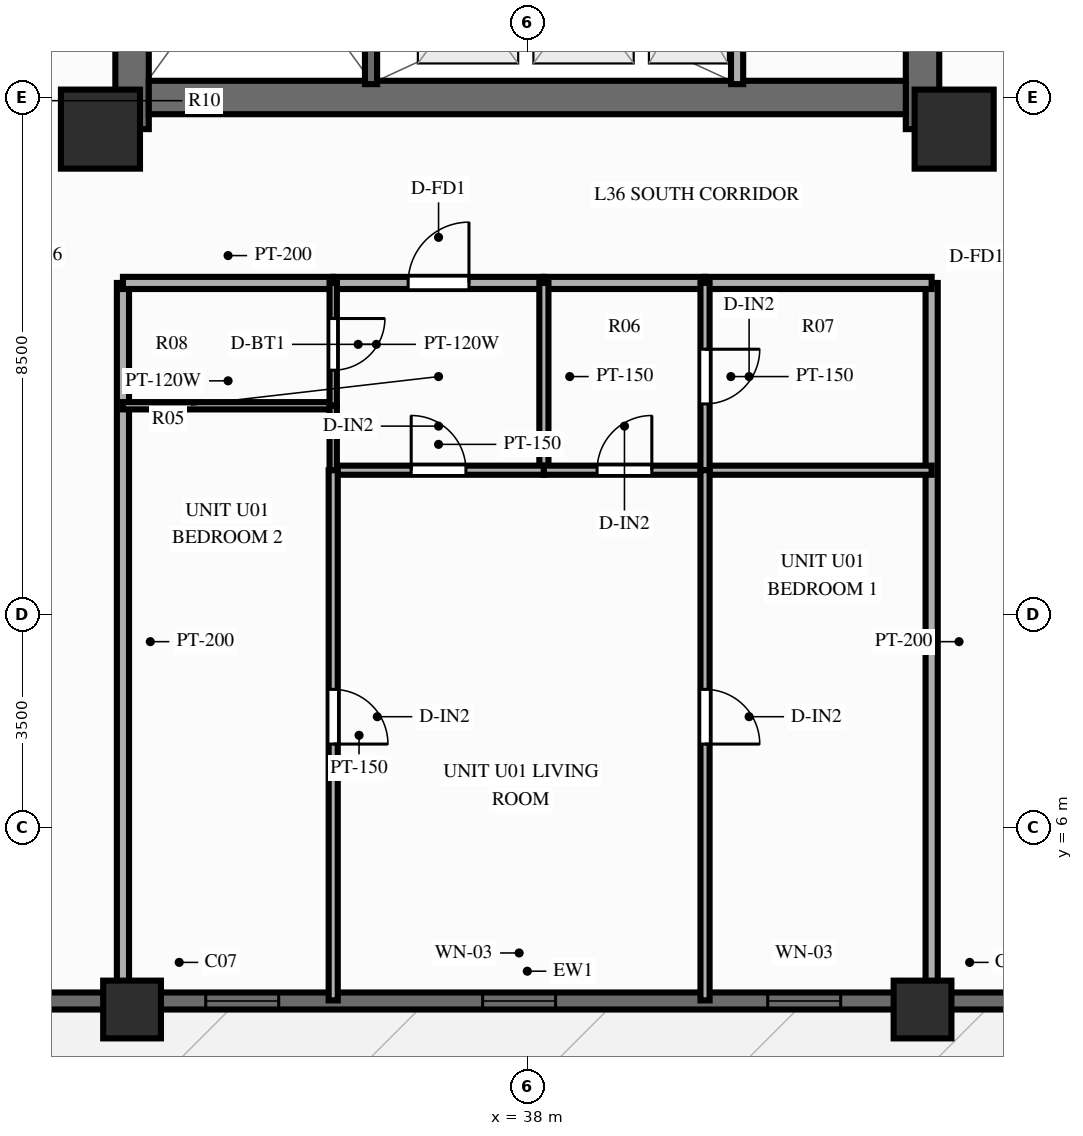
"""IFC4 building model, lengths in metres.
Left out: names, types, materials, properties, quantities, classifications, styles, units other than length and angle.
Written with IfcOpenShell. Run it as: python <this file> out.ifc"""

import sys

from ifc_helpers import new_model, si_unit, direction, frame, frame_2d, origin, origin_2d, place, context, subcontext, project, spatial, rectangle, extrude, source, transform, mapped, element, fill, save


model = new_model("IFC4")
c1 = context("Model", 3, precision=1e-05, world=origin(), true_north=direction((0.0, 1.0)))
c2 = subcontext(c1, "Body", "Model", "MODEL_VIEW")
j1 = project(units=[si_unit("LENGTHUNIT", "METRE"), si_unit("PLANEANGLEUNIT", "RADIAN")], contexts=[c1])
p1 = place(None, origin())
s1 = spatial("IfcSite", under=j1, at=p1, CompositionType="ELEMENT")
p2 = place(p1, origin())
s2 = spatial("IfcBuilding", under=s1, at=p2, CompositionType="ELEMENT")
p3 = place(p2, frame((0.0, 0.0, 113.85)))
s3 = spatial("IfcBuildingStorey", under=s2, at=p3, CompositionType="ELEMENT", Elevation=113.85)
p4 = place(p3, frame((31.5, 17.48, 0.0), z_axis=(0.0, 0.0, 1.0), x_axis=(0.0, 1.0, 0.0)))
e1 = element("IfcWall", 1, at=p4, inside=s3, PredefinedType="SHEAR", context=c2, shape_type="SweptSolid", body=[
    extrude(rectangle(XDim=19.04, YDim=0.55, at=frame_2d((9.52, 0.0))), origin(), (0.0, 0.0, 1.0), 3.0),
])
p5 = place(p4, frame((6.32, 0.0, 0.0)))
e2 = element("IfcOpeningElement", 2, at=p5, cuts=e1, PredefinedType="OPENING", context=c2, shape_type="SweptSolid", body=[
    extrude(rectangle(XDim=1.1, YDim=2.15, at=frame_2d((0.55, 1.075))), frame((0.0, 0.287, 0.0), z_axis=(0.0, -1.0, 0.0), x_axis=(1.0, 0.0, 0.0)), (0.0, 0.0, 1.0), 0.574),
])
p6 = place(p3, frame((44.5, 17.48, 0.0), z_axis=(0.0, 0.0, 1.0), x_axis=(0.0, 1.0, 0.0)))
e3 = element("IfcWall", 3, at=p6, inside=s3, PredefinedType="SHEAR", context=c2, shape_type="SweptSolid", body=[
    extrude(rectangle(XDim=19.04, YDim=0.55, at=frame_2d((9.52, 0.0))), origin(), (0.0, 0.0, 1.0), 3.0),
])
p7 = place(p6, frame((12.67, 0.0, 0.0), z_axis=(0.0, 0.0, 1.0), x_axis=(-1.0, 0.0, 0.0)))
e4 = element("IfcOpeningElement", 4, at=p7, cuts=e3, PredefinedType="OPENING", context=c2, shape_type="SweptSolid", body=[
    extrude(rectangle(XDim=1.1, YDim=2.15, at=frame_2d((0.55, 1.075))), frame((0.0, 0.287, 0.0), z_axis=(0.0, -1.0, 0.0), x_axis=(1.0, 0.0, 0.0)), (0.0, 0.0, 1.0), 0.574),
])
p8 = place(p3, frame((31.775, 18.0, 0.0), z_axis=(0.0, 0.0, 1.0), x_axis=(1.0, 0.0, 0.0)))
e5 = element("IfcWall", 5, at=p8, inside=s3, PredefinedType="SHEAR", context=c2, shape_type="SweptSolid", body=[
    extrude(rectangle(XDim=12.45, YDim=0.55, at=frame_2d((6.225, 0.0))), origin(), (0.0, 0.0, 1.0), 3.0),
])
m1 = source(origin(), c2, "Body", "SweptSolid", [
    extrude(rectangle(XDim=1.3, YDim=1.3, at=origin_2d()), origin(), (0.0, 0.0, 1.0), 3.0),
])
for number, where, z_axis, x_axis in (
    (6, (30.98, 17.48, 0.0), (0.0, 0.0, 1.0), (1.0, 0.0, 0.0)),
    (7, (45.02, 17.48, 0.0), (0.0, 0.0, 1.0), (1.0, 0.0, 0.0)),
):
    element("IfcColumn", number, at=place(p3, frame(where, z_axis=z_axis, x_axis=x_axis)), inside=s3, PredefinedType="COLUMN", context=c2, shape_type="MappedRepresentation", body=[
        mapped(m1, transform((0.0, 0.0, 0.0), scale=1.0)),
    ])
m2 = source(origin(), c2, "Body", "SweptSolid", [
    extrude(rectangle(XDim=0.95, YDim=0.95, at=origin_2d()), origin(), (0.0, 0.0, 1.0), 3.0),
])
for number, where, z_axis, x_axis in (
    (8, (31.5, 3.0, 0.0), (0.0, 0.0, 1.0), (1.0, 0.0, 0.0)),
    (9, (44.5, 3.0, 0.0), (0.0, 0.0, 1.0), (1.0, 0.0, 0.0)),
):
    element("IfcColumn", number, at=place(p3, frame(where, z_axis=z_axis, x_axis=x_axis)), inside=s3, PredefinedType="COLUMN", context=c2, shape_type="MappedRepresentation", body=[
        mapped(m2, transform((0.0, 0.0, 0.0), scale=1.0)),
    ])
p9 = place(p3, frame((16.2, 3.14, 0.0), z_axis=(0.0, 0.0, 1.0), x_axis=(1.0, 0.0, 0.0)))
e10 = element("IfcWall", 10, at=p9, inside=s3, PredefinedType="SOLIDWALL", context=c2, shape_type="SweptSolid", body=[
    extrude(rectangle(XDim=43.6, YDim=0.28, at=frame_2d((21.8, 0.0))), origin(), (0.0, 0.0, 1.0), 2.28),
])
p10 = place(p9, frame((8.2, 0.0, 0.0), z_axis=(0.0, 0.0, 1.0), x_axis=(-1.0, 0.0, 0.0)))
e11 = element("IfcOpeningElement", 11, at=p10, cuts=e10, PredefinedType="OPENING", context=c2, shape_type="SweptSolid", body=[
    extrude(rectangle(XDim=1.1, YDim=2.15, at=frame_2d((0.55, 1.075))), frame((0.0, 0.152, 0.0), z_axis=(0.0, -1.0, 0.0), x_axis=(1.0, 0.0, 0.0)), (0.0, 0.0, 1.0), 0.304),
])
p11 = place(p9, frame((16.511, 0.0, 0.25)))
e12 = element("IfcOpeningElement", 12, at=p11, cuts=e10, PredefinedType="OPENING", context=c2, shape_type="SweptSolid", body=[
    extrude(rectangle(XDim=1.2, YDim=1.5, at=frame_2d((0.6, 0.75))), frame((0.0, 0.152, 0.0), z_axis=(0.0, -1.0, 0.0), x_axis=(1.0, 0.0, 0.0)), (0.0, 0.0, 1.0), 0.304),
])
p12 = place(p9, frame((21.065, 0.0, 0.25)))
e13 = element("IfcOpeningElement", 13, at=p12, cuts=e10, PredefinedType="OPENING", context=c2, shape_type="SweptSolid", body=[
    extrude(rectangle(XDim=1.2, YDim=1.5, at=frame_2d((0.6, 0.75))), frame((0.0, 0.152, 0.0), z_axis=(0.0, -1.0, 0.0), x_axis=(1.0, 0.0, 0.0)), (0.0, 0.0, 1.0), 0.304),
])
p13 = place(p9, frame((25.754, 0.0, 0.25)))
e14 = element("IfcOpeningElement", 14, at=p13, cuts=e10, PredefinedType="OPENING", context=c2, shape_type="SweptSolid", body=[
    extrude(rectangle(XDim=1.2, YDim=1.5, at=frame_2d((0.6, 0.75))), frame((0.0, 0.152, 0.0), z_axis=(0.0, -1.0, 0.0), x_axis=(1.0, 0.0, 0.0)), (0.0, 0.0, 1.0), 0.304),
])
p14 = place(p9, frame((35.35, 0.0, 0.25)))
e15 = element("IfcOpeningElement", 15, at=p14, cuts=e10, PredefinedType="OPENING", context=c2, shape_type="SweptSolid", body=[
    extrude(rectangle(XDim=1.2, YDim=1.5, at=frame_2d((0.6, 0.75))), frame((0.0, 0.152, 0.0), z_axis=(0.0, -1.0, 0.0), x_axis=(1.0, 0.0, 0.0)), (0.0, 0.0, 1.0), 0.304),
])
p15 = place(p3, frame((41.45, 18.22, 0.0), z_axis=(0.0, 0.0, 1.0), x_axis=(0.0, 1.0, 0.0)))
e16 = element("IfcWall", 16, at=p15, inside=s3, PredefinedType="PARTITIONING", context=c2, shape_type="SweptSolid", body=[
    extrude(rectangle(XDim=2.96, YDim=0.2, at=frame_2d((1.48, 0.0))), origin(), (0.0, 0.0, 1.0), 2.79),
])
p16 = place(p3, frame((35.43, 18.22, 0.0), z_axis=(0.0, 0.0, 1.0), x_axis=(0.0, 1.0, 0.0)))
e17 = element("IfcWall", 17, at=p16, inside=s3, PredefinedType="SOLIDWALL", context=c2, shape_type="SweptSolid", body=[
    extrude(rectangle(XDim=7.22, YDim=0.2, at=frame_2d((3.61, 0.0))), origin(), (0.0, 0.0, 1.0), 2.79),
])
p17 = place(p16, frame((6.68, 0.0, 0.0), z_axis=(0.0, 0.0, 1.0), x_axis=(-1.0, 0.0, 0.0)))
e18 = element("IfcOpeningElement", 18, at=p17, cuts=e17, PredefinedType="OPENING", context=c2, shape_type="SweptSolid", body=[
    extrude(rectangle(XDim=1.1, YDim=2.15, at=frame_2d((0.55, 1.075))), frame((0.0, 0.112, 0.0), z_axis=(0.0, -1.0, 0.0), x_axis=(1.0, 0.0, 0.0)), (0.0, 0.0, 1.0), 0.224),
])
for number, where, z_axis, x_axis in (
    (19, (31.35, 14.95, 0.0), (0.0, 0.0, 1.0), (0.0, -1.0, 0.0)),
    (20, (44.65, 14.95, 0.0), (0.0, 0.0, 1.0), (0.0, -1.0, 0.0)),
):
    element("IfcWall", number, at=place(p3, frame(where, z_axis=z_axis, x_axis=x_axis)), inside=s3, PredefinedType="PARTITIONING", context=c2, shape_type="SweptSolid", body=[
        extrude(rectangle(XDim=11.8, YDim=0.2, at=frame_2d((5.9, 0.0))), origin(), (0.0, 0.0, 1.0), 2.34),
    ])
p18 = place(p3, frame((31.35, 14.95, 0.0), z_axis=(0.0, 0.0, 1.0), x_axis=(1.0, 0.0, 0.0)))
e21 = element("IfcWall", 21, at=p18, inside=s3, PredefinedType="PARTITIONING", context=c2, shape_type="SweptSolid", body=[
    extrude(rectangle(XDim=3.458, YDim=0.2, at=frame_2d((1.729, 0.0))), origin(), (0.0, 0.0, 1.0), 2.79),
])
p19 = place(p3, frame((34.808, 14.95, 0.0), z_axis=(0.0, 0.0, 1.0), x_axis=(1.0, 0.0, 0.0)))
e22 = element("IfcWall", 22, at=p19, inside=s3, PredefinedType="PARTITIONING", context=c2, shape_type="SweptSolid", body=[
    extrude(rectangle(XDim=3.465, YDim=0.2, at=frame_2d((1.732, 0.0))), origin(), (0.0, 0.0, 1.0), 2.79),
])
p20 = place(p19, frame((1.232, 0.0, 0.0)))
e23 = element("IfcOpeningElement", 23, at=p20, cuts=e22, PredefinedType="OPENING", context=c2, shape_type="SweptSolid", body=[
    extrude(rectangle(XDim=1.0, YDim=2.15, at=frame_2d((0.5, 1.075))), frame((0.0, 0.112, 0.0), z_axis=(0.0, -1.0, 0.0), x_axis=(1.0, 0.0, 0.0)), (0.0, 0.0, 1.0), 0.224),
])
p21 = place(p3, frame((38.273, 14.95, 0.0), z_axis=(0.0, 0.0, 1.0), x_axis=(1.0, 0.0, 0.0)))
e24 = element("IfcWall", 24, at=p21, inside=s3, PredefinedType="PARTITIONING", context=c2, shape_type="SweptSolid", body=[
    extrude(rectangle(XDim=2.65, YDim=0.2, at=frame_2d((1.325, 0.0))), origin(), (0.0, 0.0, 1.0), 2.79),
])
p22 = place(p3, frame((38.273, 14.95, 0.0), z_axis=(0.0, 0.0, 1.0), x_axis=(0.0, -1.0, 0.0)))
e25 = element("IfcWall", 25, at=p22, inside=s3, PredefinedType="PARTITIONING", context=c2, shape_type="SweptSolid", body=[
    extrude(rectangle(XDim=3.08, YDim=0.15, at=frame_2d((1.54, 0.0))), origin(), (0.0, 0.0, 1.0), 2.79),
])
p23 = place(p3, frame((34.808, 11.87, 0.0), z_axis=(0.0, 0.0, 1.0), x_axis=(1.0, 0.0, 0.0)))
e26 = element("IfcWall", 26, at=p23, inside=s3, PredefinedType="PARTITIONING", context=c2, shape_type="SweptSolid", body=[
    extrude(rectangle(XDim=3.465, YDim=0.15, at=frame_2d((1.732, 0.0))), origin(), (0.0, 0.0, 1.0), 2.79),
])
p24 = place(p23, frame((1.282, 0.0, 0.0)))
e27 = element("IfcOpeningElement", 27, at=p24, cuts=e26, PredefinedType="OPENING", context=c2, shape_type="SweptSolid", body=[
    extrude(rectangle(XDim=0.9, YDim=2.1, at=frame_2d((0.45, 1.05))), frame((0.0, 0.087, 0.0), z_axis=(0.0, -1.0, 0.0), x_axis=(1.0, 0.0, 0.0)), (0.0, 0.0, 1.0), 0.174),
])
p25 = place(p3, frame((38.273, 11.87, 0.0), z_axis=(0.0, 0.0, 1.0), x_axis=(1.0, 0.0, 0.0)))
e28 = element("IfcWall", 28, at=p25, inside=s3, PredefinedType="PARTITIONING", context=c2, shape_type="SweptSolid", body=[
    extrude(rectangle(XDim=2.65, YDim=0.15, at=frame_2d((1.325, 0.0))), origin(), (0.0, 0.0, 1.0), 2.79),
])
p26 = place(p25, frame((0.875, 0.0, 0.0)))
e29 = element("IfcOpeningElement", 29, at=p26, cuts=e28, PredefinedType="OPENING", context=c2, shape_type="SweptSolid", body=[
    extrude(rectangle(XDim=0.9, YDim=2.1, at=frame_2d((0.45, 1.05))), frame((0.0, 0.087, 0.0), z_axis=(0.0, -1.0, 0.0), x_axis=(1.0, 0.0, 0.0)), (0.0, 0.0, 1.0), 0.174),
])
p27 = place(p3, frame((40.923, 14.95, 0.0), z_axis=(0.0, 0.0, 1.0), x_axis=(1.0, 0.0, 0.0)))
e30 = element("IfcWall", 30, at=p27, inside=s3, PredefinedType="PARTITIONING", context=c2, shape_type="SweptSolid", body=[
    extrude(rectangle(XDim=3.727, YDim=0.2, at=frame_2d((1.864, 0.0))), origin(), (0.0, 0.0, 1.0), 2.79),
])
p28 = place(p3, frame((31.35, 12.93, 0.0), z_axis=(0.0, 0.0, 1.0), x_axis=(1.0, 0.0, 0.0)))
e31 = element("IfcWall", 31, at=p28, inside=s3, PredefinedType="PARTITIONING", context=c2, shape_type="SweptSolid", body=[
    extrude(rectangle(XDim=3.458, YDim=0.12, at=frame_2d((1.729, 0.0))), origin(), (0.0, 0.0, 1.0), 2.79),
])
p29 = place(p3, frame((40.923, 11.87, 0.0), z_axis=(0.0, 0.0, 1.0), x_axis=(1.0, 0.0, 0.0)))
e32 = element("IfcWall", 32, at=p29, inside=s3, PredefinedType="PARTITIONING", context=c2, shape_type="SweptSolid", body=[
    extrude(rectangle(XDim=3.727, YDim=0.15, at=frame_2d((1.864, 0.0))), origin(), (0.0, 0.0, 1.0), 2.79),
])
p30 = place(p3, frame((34.808, 14.95, 0.0), z_axis=(0.0, 0.0, 1.0), x_axis=(0.0, -1.0, 0.0)))
e33 = element("IfcWall", 33, at=p30, inside=s3, PredefinedType="PARTITIONING", context=c2, shape_type="SweptSolid", body=[
    extrude(rectangle(XDim=2.02, YDim=0.12, at=frame_2d((1.01, 0.0))), origin(), (0.0, 0.0, 1.0), 2.79),
])
p31 = place(p30, frame((0.585, 0.0, 0.0)))
e34 = element("IfcOpeningElement", 34, at=p31, cuts=e33, PredefinedType="OPENING", context=c2, shape_type="SweptSolid", body=[
    extrude(rectangle(XDim=0.85, YDim=2.05, at=frame_2d((0.425, 1.025))), frame((0.0, 0.072, 0.0), z_axis=(0.0, -1.0, 0.0), x_axis=(1.0, 0.0, 0.0)), (0.0, 0.0, 1.0), 0.144),
])
p32 = place(p3, frame((34.808, 12.93, 0.0), z_axis=(0.0, 0.0, 1.0), x_axis=(0.0, -1.0, 0.0)))
e35 = element("IfcWall", 35, at=p32, inside=s3, PredefinedType="PARTITIONING", context=c2, shape_type="SweptSolid", body=[
    extrude(rectangle(XDim=1.06, YDim=0.12, at=frame_2d((0.53, 0.0))), origin(), (0.0, 0.0, 1.0), 2.79),
])
p33 = place(p3, frame((34.808, 11.87, 0.0), z_axis=(0.0, 0.0, 1.0), x_axis=(0.0, -1.0, 0.0)))
e36 = element("IfcWall", 36, at=p33, inside=s3, PredefinedType="PARTITIONING", context=c2, shape_type="SweptSolid", body=[
    extrude(rectangle(XDim=8.72, YDim=0.15, at=frame_2d((4.36, 0.0))), origin(), (0.0, 0.0, 1.0), 2.79),
])
p34 = place(p33, frame((3.604, 0.0, 0.0)))
e37 = element("IfcOpeningElement", 37, at=p34, cuts=e36, PredefinedType="OPENING", context=c2, shape_type="SweptSolid", body=[
    extrude(rectangle(XDim=0.9, YDim=2.1, at=frame_2d((0.45, 1.05))), frame((0.0, 0.087, 0.0), z_axis=(0.0, -1.0, 0.0), x_axis=(1.0, 0.0, 0.0)), (0.0, 0.0, 1.0), 0.174),
])
p35 = place(p3, frame((40.923, 14.95, 0.0), z_axis=(0.0, 0.0, 1.0), x_axis=(0.0, -1.0, 0.0)))
e38 = element("IfcWall", 38, at=p35, inside=s3, PredefinedType="PARTITIONING", context=c2, shape_type="SweptSolid", body=[
    extrude(rectangle(XDim=3.08, YDim=0.15, at=frame_2d((1.54, 0.0))), origin(), (0.0, 0.0, 1.0), 2.79),
])
p36 = place(p35, frame((1.09, 0.0, 0.0)))
e39 = element("IfcOpeningElement", 39, at=p36, cuts=e38, PredefinedType="OPENING", context=c2, shape_type="SweptSolid", body=[
    extrude(rectangle(XDim=0.9, YDim=2.1, at=frame_2d((0.45, 1.05))), frame((0.0, 0.087, 0.0), z_axis=(0.0, -1.0, 0.0), x_axis=(1.0, 0.0, 0.0)), (0.0, 0.0, 1.0), 0.174),
])
p37 = place(p3, frame((40.923, 11.87, 0.0), z_axis=(0.0, 0.0, 1.0), x_axis=(0.0, -1.0, 0.0)))
e40 = element("IfcWall", 40, at=p37, inside=s3, PredefinedType="PARTITIONING", context=c2, shape_type="SweptSolid", body=[
    extrude(rectangle(XDim=8.72, YDim=0.15, at=frame_2d((4.36, 0.0))), origin(), (0.0, 0.0, 1.0), 2.79),
])
p38 = place(p37, frame((3.604, 0.0, 0.0)))
e41 = element("IfcOpeningElement", 41, at=p38, cuts=e40, PredefinedType="OPENING", context=c2, shape_type="SweptSolid", body=[
    extrude(rectangle(XDim=0.9, YDim=2.1, at=frame_2d((0.45, 1.05))), frame((0.0, 0.087, 0.0), z_axis=(0.0, -1.0, 0.0), x_axis=(1.0, 0.0, 0.0)), (0.0, 0.0, 1.0), 0.174),
])
m3 = source(origin(), c2, "Body", "SweptSolid", [
    extrude(rectangle(XDim=1.2, YDim=1.5, at=frame_2d((0.6, 0.75))), frame((0.0, 0.03, 0.0), z_axis=(0.0, -1.0, 0.0), x_axis=(1.0, 0.0, 0.0)), (0.0, 0.0, 1.0), 0.06),
])
p39 = place(p11, origin())
e42 = element("IfcWindow", 42, at=p39, inside=s3, PartitioningType="SINGLE_PANEL", PredefinedType="WINDOW", context=c2, shape_type="MappedRepresentation", body=[
    mapped(m3, transform((0.0, 0.0, 0.0), scale=1.0)),
])
fill(e12, e42)
p40 = place(p12, origin())
e43 = element("IfcWindow", 43, at=p40, inside=s3, PartitioningType="SINGLE_PANEL", PredefinedType="WINDOW", context=c2, shape_type="MappedRepresentation", body=[
    mapped(m3, transform((0.0, 0.0, 0.0), scale=1.0)),
])
fill(e13, e43)
p41 = place(p13, origin())
e44 = element("IfcWindow", 44, at=p41, inside=s3, PartitioningType="SINGLE_PANEL", PredefinedType="WINDOW", context=c2, shape_type="MappedRepresentation", body=[
    mapped(m3, transform((0.0, 0.0, 0.0), scale=1.0)),
])
fill(e14, e44)
m4 = source(origin(), c2, "Body", "SweptSolid", [
    extrude(rectangle(XDim=1.0, YDim=2.15, at=frame_2d((0.5, 1.075))), frame((0.0, 0.025, 0.0), z_axis=(0.0, -1.0, 0.0), x_axis=(1.0, 0.0, 0.0)), (0.0, 0.0, 1.0), 0.05),
])
p42 = place(p20, origin())
e45 = element("IfcDoor", 45, at=p42, inside=s3, OperationType="SINGLE_SWING_RIGHT", PredefinedType="DOOR", context=c2, shape_type="MappedRepresentation", body=[
    mapped(m4, transform((0.0, 0.0, 0.0), scale=1.0)),
])
fill(e23, e45)
m5 = source(origin(), c2, "Body", "SweptSolid", [
    extrude(rectangle(XDim=0.9, YDim=2.1, at=frame_2d((0.45, 1.05))), frame((0.0, 0.025, 0.0), z_axis=(0.0, -1.0, 0.0), x_axis=(1.0, 0.0, 0.0)), (0.0, 0.0, 1.0), 0.05),
])
p43 = place(p24, origin())
e46 = element("IfcDoor", 46, at=p43, inside=s3, OperationType="SINGLE_SWING_LEFT", PredefinedType="DOOR", context=c2, shape_type="MappedRepresentation", body=[
    mapped(m5, transform((0.0, 0.0, 0.0), scale=1.0)),
])
fill(e27, e46)
p44 = place(p26, origin())
e47 = element("IfcDoor", 47, at=p44, inside=s3, OperationType="SINGLE_SWING_RIGHT", PredefinedType="DOOR", context=c2, shape_type="MappedRepresentation", body=[
    mapped(m5, transform((0.0, 0.0, 0.0), scale=1.0)),
])
fill(e29, e47)
m6 = source(origin(), c2, "Body", "SweptSolid", [
    extrude(rectangle(XDim=0.85, YDim=2.05, at=frame_2d((0.425, 1.025))), frame((0.0, 0.025, 0.0), z_axis=(0.0, -1.0, 0.0), x_axis=(1.0, 0.0, 0.0)), (0.0, 0.0, 1.0), 0.05),
])
p45 = place(p31, origin())
e48 = element("IfcDoor", 48, at=p45, inside=s3, OperationType="SINGLE_SWING_LEFT", PredefinedType="DOOR", context=c2, shape_type="MappedRepresentation", body=[
    mapped(m6, transform((0.0, 0.0, 0.0), scale=1.0)),
])
fill(e34, e48)
p46 = place(p34, origin())
e49 = element("IfcDoor", 49, at=p46, inside=s3, OperationType="SINGLE_SWING_RIGHT", PredefinedType="DOOR", context=c2, shape_type="MappedRepresentation", body=[
    mapped(m5, transform((0.0, 0.0, 0.0), scale=1.0)),
])
fill(e37, e49)
p47 = place(p36, origin())
e50 = element("IfcDoor", 50, at=p47, inside=s3, OperationType="SINGLE_SWING_LEFT", PredefinedType="DOOR", context=c2, shape_type="MappedRepresentation", body=[
    mapped(m5, transform((0.0, 0.0, 0.0), scale=1.0)),
])
fill(e39, e50)
p48 = place(p38, origin())
e51 = element("IfcDoor", 51, at=p48, inside=s3, OperationType="SINGLE_SWING_RIGHT", PredefinedType="DOOR", context=c2, shape_type="MappedRepresentation", body=[
    mapped(m5, transform((0.0, 0.0, 0.0), scale=1.0)),
])
fill(e41, e51)
save(model, sys.argv[1])
